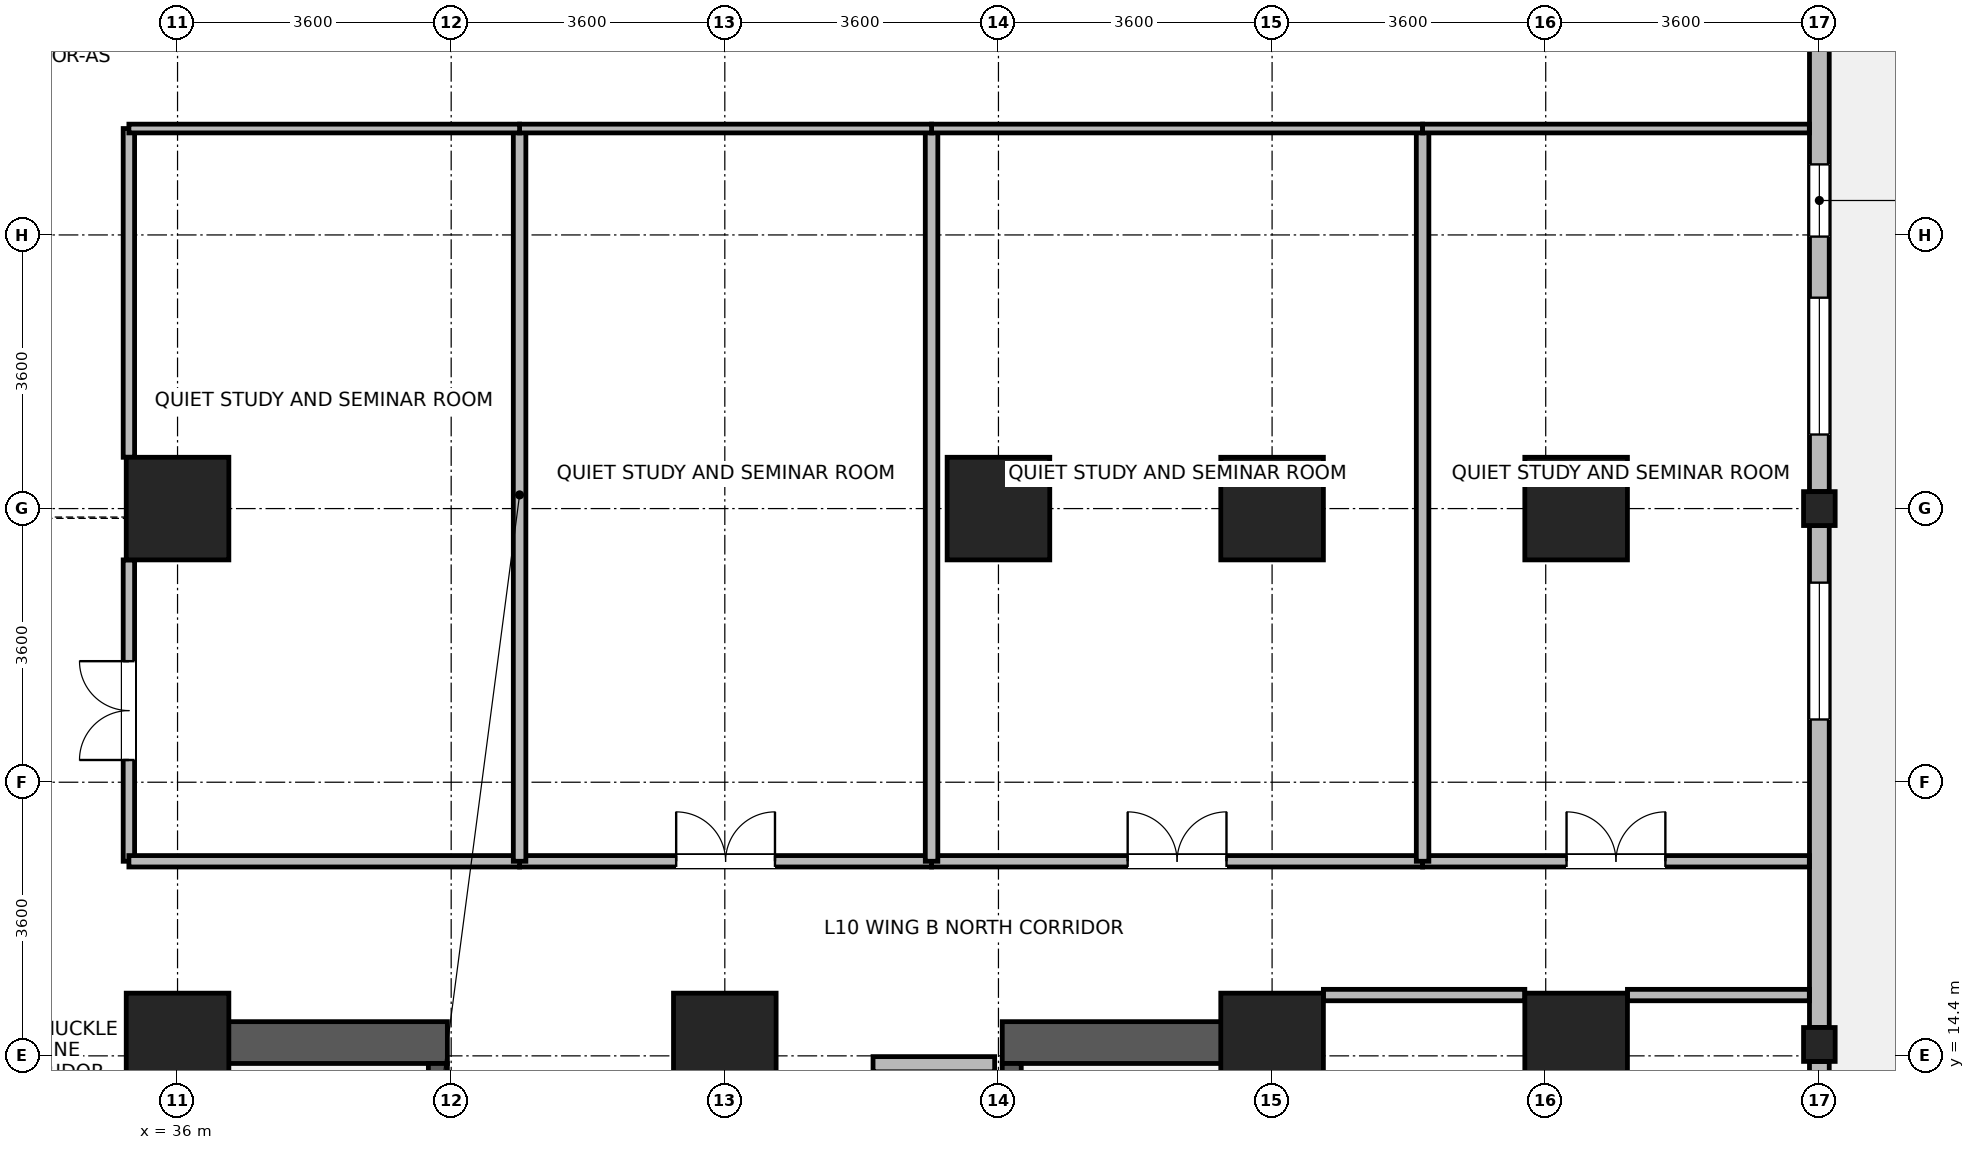
"""IFC4 building model, lengths in metres.
Left out: names, types, materials, properties, quantities, classifications, styles, units other than length and angle.
Written with IfcOpenShell. Run it as: python <this file> out.ifc"""

import sys

from ifc_helpers import new_model, si_unit, direction, frame, frame_2d, origin, origin_2d, place, context, subcontext, project, spatial, rectangle, i_section, extrude, source, transform, mapped, element, fill, save


model = new_model("IFC4")
c1 = context("Model", 3, precision=1e-05, world=origin(), true_north=direction((0.0, 1.0)))
c2 = subcontext(c1, "Body", "Model", "MODEL_VIEW")
j1 = project(units=[si_unit("LENGTHUNIT", "METRE"), si_unit("PLANEANGLEUNIT", "RADIAN")], contexts=[c1])
p1 = place(None, origin())
s1 = spatial("IfcSite", under=j1, at=p1, CompositionType="ELEMENT")
p2 = place(p1, origin())
s2 = spatial("IfcBuilding", under=s1, at=p2, CompositionType="ELEMENT")
p3 = place(p2, frame((0.0, 0.0, 43.8)))
s3 = spatial("IfcBuildingStorey", under=s2, at=p3, CompositionType="ELEMENT", Elevation=43.8)
for number, where, z_axis, x_axis in (
    (1, (36.075, 6.75, 0.0), (0.0, 0.0, 1.0), (0.0, 1.0, 0.0)),
    (2, (50.325, 6.75, 0.0), (0.0, 0.0, 1.0), (0.0, 1.0, 0.0)),
):
    element("IfcWall", number, at=place(p3, frame(where, z_axis=z_axis, x_axis=x_axis)), inside=s3, PredefinedType="SHEAR", context=c2, shape_type="SweptSolid", body=[
        extrude(rectangle(XDim=8.1, YDim=0.55, at=frame_2d((4.05, 0.0))), origin(), (0.0, 0.0, 1.0), 3.45),
    ])
for number, where, z_axis, x_axis in (
    (3, (36.35, 14.575, 0.0), (0.0, 0.0, 1.0), (1.0, 0.0, 0.0)),
    (4, (46.85, 14.575, 0.0), (0.0, 0.0, 1.0), (1.0, 0.0, 0.0)),
):
    element("IfcWall", number, at=place(p3, frame(where, z_axis=z_axis, x_axis=x_axis)), inside=s3, PredefinedType="SHEAR", context=c2, shape_type="SweptSolid", body=[
        extrude(rectangle(XDim=3.2, YDim=0.55, at=frame_2d((1.6, 0.0))), origin(), (0.0, 0.0, 1.0), 3.45),
    ])
p4 = place(p3, frame((39.425, 7.3, 0.0), z_axis=(0.0, 0.0, 1.0), x_axis=(0.0, 1.0, 0.0)))
e5 = element("IfcWall", 5, at=p4, inside=s3, PredefinedType="SHEAR", context=c2, shape_type="SweptSolid", body=[
    extrude(rectangle(XDim=7.0, YDim=0.25, at=frame_2d((3.5, 0.0))), origin(), (0.0, 0.0, 1.0), 3.45),
])
p5 = place(p4, frame((0.15, 0.0, 0.0)))
e6 = element("IfcOpeningElement", 6, at=p5, cuts=e5, PredefinedType="OPENING", context=c2, shape_type="SweptSolid", body=[
    extrude(rectangle(XDim=1.1, YDim=2.08, at=frame_2d((0.55, 1.04))), frame((0.0, 0.135, 0.0), z_axis=(0.0, -1.0, 0.0), x_axis=(1.0, 0.0, 0.0)), (0.0, 0.0, 1.0), 0.27),
])
p6 = place(p3, frame((46.975, 7.3, 0.0), z_axis=(0.0, 0.0, 1.0), x_axis=(0.0, 1.0, 0.0)))
e7 = element("IfcWall", 7, at=p6, inside=s3, PredefinedType="SHEAR", context=c2, shape_type="SweptSolid", body=[
    extrude(rectangle(XDim=7.0, YDim=0.25, at=frame_2d((3.5, 0.0))), origin(), (0.0, 0.0, 1.0), 3.45),
])
p7 = place(p6, frame((0.15, 0.0, 0.0)))
e8 = element("IfcOpeningElement", 8, at=p7, cuts=e7, PredefinedType="OPENING", context=c2, shape_type="SweptSolid", body=[
    extrude(rectangle(XDim=1.1, YDim=2.08, at=frame_2d((0.55, 1.04))), frame((0.0, 0.135, 0.0), z_axis=(0.0, -1.0, 0.0), x_axis=(1.0, 0.0, 0.0)), (0.0, 0.0, 1.0), 0.27),
])
m1 = source(origin(), c2, "Body", "SweptSolid", [
    extrude(rectangle(XDim=1.35, YDim=1.35, at=origin_2d()), origin(), (0.0, 0.0, 1.0), 3.7),
])
for number, where, z_axis, x_axis in (
    (9, (36.0, 21.6, 0.0), (0.0, 0.0, 1.0), (1.0, 0.0, 0.0)),
    (10, (46.8, 21.6, 0.0), (0.0, 0.0, 1.0), (1.0, 0.0, 0.0)),
    (11, (36.0, 14.55, 0.0), (0.0, 0.0, 1.0), (1.0, 0.0, 0.0)),
    (12, (43.2, 14.55, 0.0), (0.0, 0.0, 1.0), (1.0, 0.0, 0.0)),
    (13, (50.4, 14.55, 0.0), (0.0, 0.0, 1.0), (1.0, 0.0, 0.0)),
    (14, (50.4, 21.6, 0.0), (0.0, 0.0, 1.0), (1.0, 0.0, 0.0)),
    (15, (54.4, 14.55, 0.0), (0.0, 0.0, 1.0), (1.0, 0.0, 0.0)),
    (16, (54.4, 21.6, 0.0), (0.0, 0.0, 1.0), (1.0, 0.0, 0.0)),
):
    element("IfcColumn", number, at=place(p3, frame(where, z_axis=z_axis, x_axis=x_axis)), inside=s3, PredefinedType="COLUMN", context=c2, shape_type="MappedRepresentation", body=[
        mapped(m1, transform((0.0, 0.0, 0.0), x_axis=(1.0, 0.0, 0.0), y_axis=(0.0, 1.0, 0.0), z_axis=(0.0, 0.0, 1.0), scale=1.0)),
    ])
m2 = source(origin(), c2, "Body", "SweptSolid", [
    extrude(i_section(OverallWidth=0.416, OverallDepth=0.446, WebThickness=0.029, FlangeThickness=0.04, FilletRadius=0.015, at=origin_2d()), origin(), (0.0, 0.0, 1.0), 3.7),
])
for number, where, z_axis, x_axis in (
    (17, (57.6, 14.55, 0.0), (0.0, 0.0, 1.0), (1.0, 0.0, 0.0)),
    (18, (57.6, 21.6, 0.0), (0.0, 0.0, 1.0), (1.0, 0.0, 0.0)),
):
    element("IfcColumn", number, at=place(p3, frame(where, z_axis=z_axis, x_axis=x_axis)), inside=s3, PredefinedType="COLUMN", context=c2, shape_type="MappedRepresentation", body=[
        mapped(m2, transform((0.0, 0.0, 0.0), x_axis=(1.0, 0.0, 0.0), y_axis=(0.0, 1.0, 0.0), z_axis=(0.0, 0.0, 1.0), scale=1.0)),
    ])
p8 = place(p3, frame((57.6, 14.326, 0.0), z_axis=(0.0, 0.0, 1.0), x_axis=(0.0, -1.0, 0.0)))
e19 = element("IfcWall", 19, at=p8, inside=s3, PredefinedType="STANDARD", context=c2, shape_type="SweptSolid", body=[
    extrude(rectangle(XDim=7.052, YDim=0.26, at=frame_2d((3.526, 0.0))), origin(), (0.0, 0.0, 1.0), 2.93),
])
p9 = place(p8, frame((0.863, 0.0, 0.85)))
e20 = element("IfcOpeningElement", 20, at=p9, cuts=e19, PredefinedType="OPENING", context=c2, shape_type="SweptSolid", body=[
    extrude(rectangle(XDim=1.8, YDim=1.85, at=frame_2d((0.9, 0.925))), frame((0.0, 0.14, 0.0), z_axis=(0.0, -1.0, 0.0), x_axis=(1.0, 0.0, 0.0)), (0.0, 0.0, 1.0), 0.28),
])
p10 = place(p8, frame((4.389, 0.0, 0.85)))
e21 = element("IfcOpeningElement", 21, at=p10, cuts=e19, PredefinedType="OPENING", context=c2, shape_type="SweptSolid", body=[
    extrude(rectangle(XDim=1.8, YDim=1.85, at=frame_2d((0.9, 0.925))), frame((0.0, 0.14, 0.0), z_axis=(0.0, -1.0, 0.0), x_axis=(1.0, 0.0, 0.0)), (0.0, 0.0, 1.0), 0.28),
])
p11 = place(p3, frame((57.6, 21.376, 0.0), z_axis=(0.0, 0.0, 1.0), x_axis=(0.0, -1.0, 0.0)))
e22 = element("IfcWall", 22, at=p11, inside=s3, PredefinedType="STANDARD", context=c2, shape_type="SweptSolid", body=[
    extrude(rectangle(XDim=6.602, YDim=0.26, at=frame_2d((3.301, 0.0))), origin(), (0.0, 0.0, 1.0), 2.93),
])
p12 = place(p11, frame((0.75, 0.0, 0.85)))
e23 = element("IfcOpeningElement", 23, at=p12, cuts=e22, PredefinedType="OPENING", context=c2, shape_type="SweptSolid", body=[
    extrude(rectangle(XDim=1.8, YDim=1.85, at=frame_2d((0.9, 0.925))), frame((0.0, 0.14, 0.0), z_axis=(0.0, -1.0, 0.0), x_axis=(1.0, 0.0, 0.0)), (0.0, 0.0, 1.0), 0.28),
])
p13 = place(p3, frame((57.6, 28.426, 0.0), z_axis=(0.0, 0.0, 1.0), x_axis=(0.0, -1.0, 0.0)))
e24 = element("IfcWall", 24, at=p13, inside=s3, PredefinedType="STANDARD", context=c2, shape_type="SweptSolid", body=[
    extrude(rectangle(XDim=6.602, YDim=0.26, at=frame_2d((3.301, 0.0))), origin(), (0.0, 0.0, 1.0), 2.93),
])
p14 = place(p13, frame((4.052, 0.0, 0.85)))
e25 = element("IfcOpeningElement", 25, at=p14, cuts=e24, PredefinedType="OPENING", context=c2, shape_type="SweptSolid", body=[
    extrude(rectangle(XDim=1.8, YDim=1.85, at=frame_2d((0.9, 0.925))), frame((0.0, 0.14, 0.0), z_axis=(0.0, -1.0, 0.0), x_axis=(1.0, 0.0, 0.0)), (0.0, 0.0, 1.0), 0.28),
])
p15 = place(p13, frame((2.298, 0.0, 0.85)))
e26 = element("IfcOpeningElement", 26, at=p15, cuts=e24, PredefinedType="OPENING", context=c2, shape_type="SweptSolid", body=[
    extrude(rectangle(XDim=0.95, YDim=1.75, at=frame_2d((0.475, 0.875))), frame((0.0, 0.14, 0.0), z_axis=(0.0, -1.0, 0.0), x_axis=(1.0, 0.0, 0.0)), (0.0, 0.0, 1.0), 0.28),
])
p16 = place(p3, frame((45.15, 14.29, 0.0), z_axis=(0.0, 0.0, 1.0), x_axis=(1.0, 0.0, 0.0)))
e27 = element("IfcWall", 27, at=p16, inside=s3, PredefinedType="PARTITIONING", context=c2, shape_type="SweptSolid", body=[
    extrude(rectangle(XDim=1.6, YDim=0.2, at=frame_2d((0.8, 0.0))), origin(), (0.0, 0.0, 1.0), 2.23),
])
p17 = place(p3, frame((35.36, 16.96, 0.0), z_axis=(0.0, 0.0, 1.0), x_axis=(0.0, 1.0, 0.0)))
e28 = element("IfcWall", 28, at=p17, inside=s3, PredefinedType="PARTITIONING", context=c2, shape_type="SweptSolid", body=[
    extrude(rectangle(XDim=3.965, YDim=0.15, at=frame_2d((1.982, 0.0))), origin(), (0.0, 0.0, 1.0), 3.43),
])
p18 = place(p17, frame((1.333, 0.0, 0.0)))
e29 = element("IfcOpeningElement", 29, at=p18, cuts=e28, PredefinedType="OPENING", context=c2, shape_type="SweptSolid", body=[
    extrude(rectangle(XDim=1.3, YDim=2.12, at=frame_2d((0.65, 1.06))), frame((0.0, 0.085, 0.0), z_axis=(0.0, -1.0, 0.0), x_axis=(1.0, 0.0, 0.0)), (0.0, 0.0, 1.0), 0.17),
])
p19 = place(p3, frame((35.36, 22.275, 0.0), z_axis=(0.0, 0.0, 1.0), x_axis=(0.0, 1.0, 0.0)))
e30 = element("IfcWall", 30, at=p19, inside=s3, PredefinedType="PARTITIONING", context=c2, shape_type="SweptSolid", body=[
    extrude(rectangle(XDim=4.325, YDim=0.15, at=frame_2d((2.163, 0.0))), origin(), (0.0, 0.0, 1.0), 3.43),
])
p20 = place(p3, frame((51.075, 15.2, 0.0), z_axis=(0.0, 0.0, 1.0), x_axis=(1.0, 0.0, 0.0)))
e31 = element("IfcWall", 31, at=p20, inside=s3, PredefinedType="PARTITIONING", context=c2, shape_type="SweptSolid", body=[
    extrude(rectangle(XDim=2.65, YDim=0.15, at=frame_2d((1.325, 0.0))), origin(), (0.0, 0.0, 1.0), 3.43),
])
p21 = place(p3, frame((55.075, 15.2, 0.0), z_axis=(0.0, 0.0, 1.0), x_axis=(1.0, 0.0, 0.0)))
e32 = element("IfcWall", 32, at=p21, inside=s3, PredefinedType="PARTITIONING", context=c2, shape_type="SweptSolid", body=[
    extrude(rectangle(XDim=2.393, YDim=0.15, at=frame_2d((1.197, 0.0))), origin(), (0.0, 0.0, 1.0), 3.43),
])
p22 = place(p3, frame((45.92, 16.96, 0.0), z_axis=(0.0, 0.0, 1.0), x_axis=(1.0, 0.0, 0.0)))
e33 = element("IfcWall", 33, at=p22, inside=s3, PredefinedType="PARTITIONING", context=c2, shape_type="SweptSolid", body=[
    extrude(rectangle(XDim=6.46, YDim=0.15, at=frame_2d((3.23, 0.0))), origin(), (0.0, 0.0, 1.0), 3.43),
])
p23 = place(p22, frame((2.58, 0.0, 0.0)))
e34 = element("IfcOpeningElement", 34, at=p23, cuts=e33, PredefinedType="OPENING", context=c2, shape_type="SweptSolid", body=[
    extrude(rectangle(XDim=1.3, YDim=2.12, at=frame_2d((0.65, 1.06))), frame((0.0, 0.085, 0.0), z_axis=(0.0, -1.0, 0.0), x_axis=(1.0, 0.0, 0.0)), (0.0, 0.0, 1.0), 0.17),
])
p24 = place(p3, frame((40.5, 16.96, 0.0), z_axis=(0.0, 0.0, 1.0), x_axis=(1.0, 0.0, 0.0)))
e35 = element("IfcWall", 35, at=p24, inside=s3, PredefinedType="PARTITIONING", context=c2, shape_type="SweptSolid", body=[
    extrude(rectangle(XDim=5.42, YDim=0.15, at=frame_2d((2.71, 0.0))), origin(), (0.0, 0.0, 1.0), 3.43),
])
p25 = place(p24, frame((2.06, 0.0, 0.0)))
e36 = element("IfcOpeningElement", 36, at=p25, cuts=e35, PredefinedType="OPENING", context=c2, shape_type="SweptSolid", body=[
    extrude(rectangle(XDim=1.3, YDim=2.12, at=frame_2d((0.65, 1.06))), frame((0.0, 0.085, 0.0), z_axis=(0.0, -1.0, 0.0), x_axis=(1.0, 0.0, 0.0)), (0.0, 0.0, 1.0), 0.17),
])
p26 = place(p3, frame((52.38, 16.96, 0.0), z_axis=(0.0, 0.0, 1.0), x_axis=(1.0, 0.0, 0.0)))
e37 = element("IfcWall", 37, at=p26, inside=s3, PredefinedType="PARTITIONING", context=c2, shape_type="SweptSolid", body=[
    extrude(rectangle(XDim=5.088, YDim=0.15, at=frame_2d((2.544, 0.0))), origin(), (0.0, 0.0, 1.0), 3.43),
])
p27 = place(p26, frame((1.894, 0.0, 0.0)))
e38 = element("IfcOpeningElement", 38, at=p27, cuts=e37, PredefinedType="OPENING", context=c2, shape_type="SweptSolid", body=[
    extrude(rectangle(XDim=1.3, YDim=2.12, at=frame_2d((0.65, 1.06))), frame((0.0, 0.085, 0.0), z_axis=(0.0, -1.0, 0.0), x_axis=(1.0, 0.0, 0.0)), (0.0, 0.0, 1.0), 0.17),
])
p28 = place(p3, frame((35.36, 16.96, 0.0), z_axis=(0.0, 0.0, 1.0), x_axis=(1.0, 0.0, 0.0)))
e39 = element("IfcWall", 39, at=p28, inside=s3, PredefinedType="PARTITIONING", context=c2, shape_type="SweptSolid", body=[
    extrude(rectangle(XDim=5.14, YDim=0.15, at=frame_2d((2.57, 0.0))), origin(), (0.0, 0.0, 1.0), 3.43),
])
for number, where, z_axis, x_axis in (
    (40, (40.5, 16.96, 0.0), (0.0, 0.0, 1.0), (0.0, 1.0, 0.0)),
    (41, (45.92, 16.96, 0.0), (0.0, 0.0, 1.0), (0.0, 1.0, 0.0)),
    (42, (52.38, 16.96, 0.0), (0.0, 0.0, 1.0), (0.0, 1.0, 0.0)),
):
    element("IfcWall", number, at=place(p3, frame(where, z_axis=z_axis, x_axis=x_axis)), inside=s3, PredefinedType="PARTITIONING", context=c2, shape_type="SweptSolid", body=[
        extrude(rectangle(XDim=9.64, YDim=0.165, at=frame_2d((4.82, 0.0))), origin(), (0.0, 0.0, 1.0), 3.43),
    ])
p29 = place(p3, frame((45.92, 26.6, 0.0), z_axis=(0.0, 0.0, 1.0), x_axis=(1.0, 0.0, 0.0)))
e43 = element("IfcWall", 43, at=p29, inside=s3, PredefinedType="PARTITIONING", context=c2, shape_type="SweptSolid", body=[
    extrude(rectangle(XDim=6.46, YDim=0.115, at=frame_2d((3.23, 0.0))), origin(), (0.0, 0.0, 1.0), 3.43),
])
p30 = place(p3, frame((40.5, 26.6, 0.0), z_axis=(0.0, 0.0, 1.0), x_axis=(1.0, 0.0, 0.0)))
e44 = element("IfcWall", 44, at=p30, inside=s3, PredefinedType="PARTITIONING", context=c2, shape_type="SweptSolid", body=[
    extrude(rectangle(XDim=5.42, YDim=0.115, at=frame_2d((2.71, 0.0))), origin(), (0.0, 0.0, 1.0), 3.43),
])
p31 = place(p3, frame((52.38, 26.6, 0.0), z_axis=(0.0, 0.0, 1.0), x_axis=(1.0, 0.0, 0.0)))
e45 = element("IfcWall", 45, at=p31, inside=s3, PredefinedType="PARTITIONING", context=c2, shape_type="SweptSolid", body=[
    extrude(rectangle(XDim=5.088, YDim=0.115, at=frame_2d((2.544, 0.0))), origin(), (0.0, 0.0, 1.0), 3.43),
])
p32 = place(p3, frame((35.36, 26.6, 0.0), z_axis=(0.0, 0.0, 1.0), x_axis=(1.0, 0.0, 0.0)))
e46 = element("IfcWall", 46, at=p32, inside=s3, PredefinedType="PARTITIONING", context=c2, shape_type="SweptSolid", body=[
    extrude(rectangle(XDim=5.14, YDim=0.115, at=frame_2d((2.57, 0.0))), origin(), (0.0, 0.0, 1.0), 3.43),
])
p33 = place(p12, origin())
e47 = element("IfcWindow", 47, at=p33, inside=s3, PartitioningType="SINGLE_PANEL", PredefinedType="WINDOW", context=c2, shape_type="SweptSolid", body=[
    extrude(rectangle(XDim=1.8, YDim=1.85, at=frame_2d((0.9, 0.925))), frame((0.0, 0.03, 0.0), z_axis=(0.0, -1.0, 0.0), x_axis=(1.0, 0.0, 0.0)), (0.0, 0.0, 1.0), 0.06),
])
fill(e23, e47)
p34 = place(p14, origin())
e48 = element("IfcWindow", 48, at=p34, inside=s3, PartitioningType="SINGLE_PANEL", PredefinedType="WINDOW", context=c2, shape_type="SweptSolid", body=[
    extrude(rectangle(XDim=1.8, YDim=1.85, at=frame_2d((0.9, 0.925))), frame((0.0, 0.03, 0.0), z_axis=(0.0, -1.0, 0.0), x_axis=(1.0, 0.0, 0.0)), (0.0, 0.0, 1.0), 0.06),
])
fill(e25, e48)
p35 = place(p15, origin())
e49 = element("IfcWindow", 49, at=p35, inside=s3, PartitioningType="SINGLE_PANEL", PredefinedType="WINDOW", context=c2, shape_type="SweptSolid", body=[
    extrude(rectangle(XDim=0.95, YDim=1.75, at=frame_2d((0.475, 0.875))), frame((0.0, 0.03, 0.0), z_axis=(0.0, -1.0, 0.0), x_axis=(1.0, 0.0, 0.0)), (0.0, 0.0, 1.0), 0.06),
])
fill(e26, e49)
p36 = place(p18, origin())
e50 = element("IfcDoor", 50, at=p36, inside=s3, OperationType="DOUBLE_DOOR_SINGLE_SWING", PredefinedType="DOOR", context=c2, shape_type="SweptSolid", body=[
    extrude(rectangle(XDim=1.3, YDim=2.12, at=frame_2d((0.65, 1.06))), frame((0.0, 0.025, 0.0), z_axis=(0.0, -1.0, 0.0), x_axis=(1.0, 0.0, 0.0)), (0.0, 0.0, 1.0), 0.05),
])
fill(e29, e50)
p37 = place(p23, origin())
e51 = element("IfcDoor", 51, at=p37, inside=s3, OperationType="DOUBLE_DOOR_SINGLE_SWING", PredefinedType="DOOR", context=c2, shape_type="SweptSolid", body=[
    extrude(rectangle(XDim=1.3, YDim=2.12, at=frame_2d((0.65, 1.06))), frame((0.0, 0.025, 0.0), z_axis=(0.0, -1.0, 0.0), x_axis=(1.0, 0.0, 0.0)), (0.0, 0.0, 1.0), 0.05),
])
fill(e34, e51)
p38 = place(p25, origin())
e52 = element("IfcDoor", 52, at=p38, inside=s3, OperationType="DOUBLE_DOOR_SINGLE_SWING", PredefinedType="DOOR", context=c2, shape_type="SweptSolid", body=[
    extrude(rectangle(XDim=1.3, YDim=2.12, at=frame_2d((0.65, 1.06))), frame((0.0, 0.025, 0.0), z_axis=(0.0, -1.0, 0.0), x_axis=(1.0, 0.0, 0.0)), (0.0, 0.0, 1.0), 0.05),
])
fill(e36, e52)
p39 = place(p27, origin())
e53 = element("IfcDoor", 53, at=p39, inside=s3, OperationType="DOUBLE_DOOR_SINGLE_SWING", PredefinedType="DOOR", context=c2, shape_type="SweptSolid", body=[
    extrude(rectangle(XDim=1.3, YDim=2.12, at=frame_2d((0.65, 1.06))), frame((0.0, 0.025, 0.0), z_axis=(0.0, -1.0, 0.0), x_axis=(1.0, 0.0, 0.0)), (0.0, 0.0, 1.0), 0.05),
])
fill(e38, e53)
save(model, sys.argv[1])
